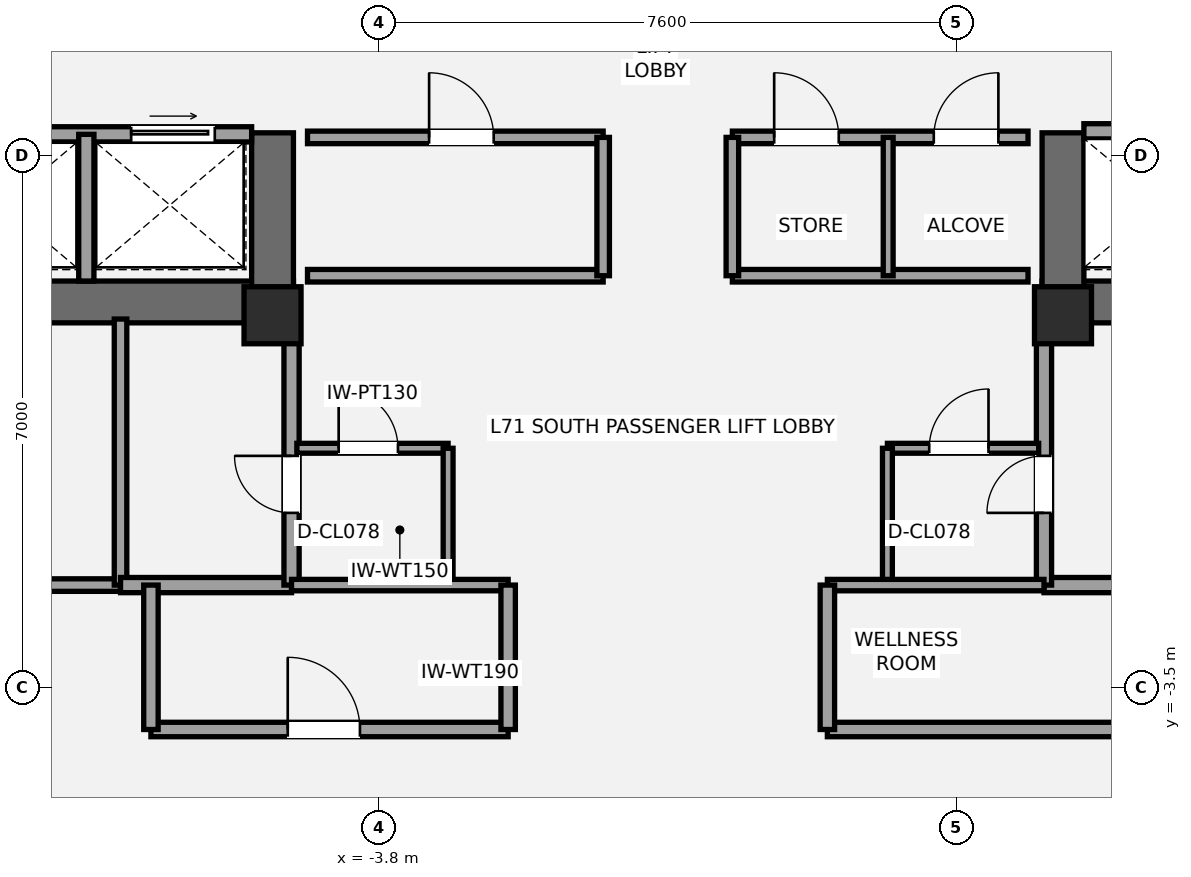
"""IFC4 building model, lengths in metres.
Left out: names, types, materials, properties, quantities, classifications, styles, units other than length and angle.
Written with IfcOpenShell. Run it as: python <this file> out.ifc"""

import sys

from ifc_helpers import new_model, si_unit, direction, frame, frame_2d, origin, origin_2d, place, context, subcontext, project, spatial, rectangle, extrude, element, fill, save


model = new_model("IFC4")
c1 = context("Model", 3, precision=1e-05, world=origin(), true_north=direction((0.0, 1.0)))
c2 = subcontext(c1, "Body", "Model", "MODEL_VIEW")
j1 = project(units=[si_unit("LENGTHUNIT", "METRE"), si_unit("PLANEANGLEUNIT", "RADIAN")], contexts=[c1])
p1 = place(None, origin())
s1 = spatial("IfcSite", under=j1, at=p1, CompositionType="ELEMENT")
p2 = place(p1, origin())
s2 = spatial("IfcBuilding", under=s1, at=p2, CompositionType="ELEMENT")
p3 = place(p2, frame((0.0, 0.0, 250.95)))
s3 = spatial("IfcBuildingStorey", under=s2, at=p3, CompositionType="ELEMENT", Elevation=250.95)
p4 = place(p3, frame((-4.925, 1.575, 0.0), z_axis=(0.0, 0.0, 1.0), x_axis=(-1.0, 0.0, 0.0)))
e1 = element("IfcWall", 1, at=p4, inside=s3, PredefinedType="SHEAR", context=c2, shape_type="SweptSolid", body=[
    extrude(rectangle(XDim=8.775, YDim=0.55, at=frame_2d((4.387, 0.0))), origin(), (0.0, 0.0, 1.0), 3.15),
])
p5 = place(p4, frame((5.375, 0.0, 0.0)))
e2 = element("IfcOpeningElement", 2, at=p5, cuts=e1, PredefinedType="OPENING", context=c2, shape_type="SweptSolid", body=[
    extrude(rectangle(XDim=1.05, YDim=2.15, at=frame_2d((0.525, 1.075))), frame((0.0, 0.285, 0.0), z_axis=(0.0, -1.0, 0.0), x_axis=(1.0, 0.0, 0.0)), (0.0, 0.0, 1.0), 0.57),
])
p6 = place(p4, frame((3.705, 0.0, 0.0)))
e3 = element("IfcOpeningElement", 3, at=p6, cuts=e1, PredefinedType="OPENING", context=c2, shape_type="SweptSolid", body=[
    extrude(rectangle(XDim=1.1, YDim=2.2, at=frame_2d((0.55, 1.1))), frame((0.0, 0.285, 0.0), z_axis=(0.0, -1.0, 0.0), x_axis=(1.0, 0.0, 0.0)), (0.0, 0.0, 1.0), 0.57),
])
p7 = place(p3, frame((-5.2, 1.3, 0.0), z_axis=(0.0, 0.0, 1.0), x_axis=(0.0, 1.0, 0.0)))
e4 = element("IfcWall", 4, at=p7, inside=s3, PredefinedType="SHEAR", context=c2, shape_type="SweptSolid", body=[
    extrude(rectangle(XDim=2.5, YDim=0.55, at=frame_2d((1.25, 0.0))), origin(), (0.0, 0.0, 1.0), 3.15),
])
p8 = place(p3, frame((13.7, 1.575, 0.0), z_axis=(0.0, 0.0, 1.0), x_axis=(-1.0, 0.0, 0.0)))
e5 = element("IfcWall", 5, at=p8, inside=s3, PredefinedType="SHEAR", context=c2, shape_type="SweptSolid", body=[
    extrude(rectangle(XDim=8.775, YDim=0.55, at=frame_2d((4.387, 0.0))), origin(), (0.0, 0.0, 1.0), 3.15),
])
p9 = place(p8, frame((2.35, 0.0, 0.0)))
e6 = element("IfcOpeningElement", 6, at=p9, cuts=e5, PredefinedType="OPENING", context=c2, shape_type="SweptSolid", body=[
    extrude(rectangle(XDim=1.05, YDim=2.15, at=frame_2d((0.525, 1.075))), frame((0.0, 0.285, 0.0), z_axis=(0.0, -1.0, 0.0), x_axis=(1.0, 0.0, 0.0)), (0.0, 0.0, 1.0), 0.57),
])
p10 = place(p8, frame((4.35, 0.0, 0.0)))
e7 = element("IfcOpeningElement", 7, at=p10, cuts=e5, PredefinedType="OPENING", context=c2, shape_type="SweptSolid", body=[
    extrude(rectangle(XDim=1.1, YDim=2.2, at=frame_2d((0.55, 1.1))), frame((0.0, 0.285, 0.0), z_axis=(0.0, -1.0, 0.0), x_axis=(1.0, 0.0, 0.0)), (0.0, 0.0, 1.0), 0.57),
])
p11 = place(p3, frame((5.2, 1.3, 0.0), z_axis=(0.0, 0.0, 1.0), x_axis=(0.0, 1.0, 0.0)))
e8 = element("IfcWall", 8, at=p11, inside=s3, PredefinedType="SHEAR", context=c2, shape_type="SweptSolid", body=[
    extrude(rectangle(XDim=2.5, YDim=0.55, at=frame_2d((1.25, 0.0))), origin(), (0.0, 0.0, 1.0), 3.15),
])
for number, where, z_axis, x_axis in (
    (9, (-5.2, 1.4, 0.0), (0.0, 0.0, 1.0), (1.0, 0.0, 0.0)),
    (10, (5.2, 1.4, 0.0), (0.0, 0.0, 1.0), (1.0, 0.0, 0.0)),
):
    element("IfcColumn", number, at=place(p3, frame(where, z_axis=z_axis, x_axis=x_axis)), inside=s3, PredefinedType="PILASTER", context=c2, shape_type="SweptSolid", body=[
        extrude(rectangle(XDim=0.75, YDim=0.75, at=origin_2d()), origin(), (0.0, 0.0, 1.0), 3.15),
    ])
p12 = place(p3, frame((-13.45, -2.15, 0.0), z_axis=(0.0, 0.0, 1.0), x_axis=(1.0, 0.0, 0.0)))
e11 = element("IfcWall", 11, at=p12, inside=s3, PredefinedType="PARTITIONING", context=c2, shape_type="SweptSolid", body=[
    extrude(rectangle(XDim=6.25, YDim=0.165, at=frame_2d((3.125, 0.0))), origin(), (0.0, 0.0, 1.0), 2.423),
])
p13 = place(p3, frame((-7.2, -2.15, 0.0), z_axis=(0.0, 0.0, 1.0), x_axis=(0.0, 1.0, 0.0)))
e12 = element("IfcWall", 12, at=p13, inside=s3, PredefinedType="PARTITIONING", context=c2, shape_type="SweptSolid", body=[
    extrude(rectangle(XDim=3.5, YDim=0.165, at=frame_2d((1.75, 0.0))), origin(), (0.0, 0.0, 1.0), 2.423),
])
p14 = place(p3, frame((-7.2, -2.15, 0.0), z_axis=(0.0, 0.0, 1.0), x_axis=(1.0, 0.0, 0.0)))
e13 = element("IfcWall", 13, at=p14, inside=s3, PredefinedType="SOLIDWALL", context=c2, shape_type="SweptSolid", body=[
    extrude(rectangle(XDim=2.25, YDim=0.2, at=frame_2d((1.125, 0.0))), origin(), (0.0, 0.0, 1.0), 2.97),
])
p15 = place(p3, frame((-4.95, -2.15, 0.0), z_axis=(0.0, 0.0, 1.0), x_axis=(0.0, 1.0, 0.0)))
e14 = element("IfcWall", 14, at=p15, inside=s3, PredefinedType="SOLIDWALL", context=c2, shape_type="SweptSolid", body=[
    extrude(rectangle(XDim=3.5, YDim=0.2, at=frame_2d((1.75, 0.0))), origin(), (0.0, 0.0, 1.0), 2.423),
])
p16 = place(p15, frame((0.95, 0.0, 0.0)))
e15 = element("IfcOpeningElement", 15, at=p16, cuts=e14, PredefinedType="OPENING", context=c2, shape_type="SweptSolid", body=[
    extrude(rectangle(XDim=0.75, YDim=2.1, at=frame_2d((0.375, 1.05))), frame((0.0, 0.11, 0.0), z_axis=(0.0, -1.0, 0.0), x_axis=(1.0, 0.0, 0.0)), (0.0, 0.0, 1.0), 0.22),
])
p17 = place(p3, frame((4.95, -2.15, 0.0), z_axis=(0.0, 0.0, 1.0), x_axis=(1.0, 0.0, 0.0)))
e16 = element("IfcWall", 16, at=p17, inside=s3, PredefinedType="SOLIDWALL", context=c2, shape_type="SweptSolid", body=[
    extrude(rectangle(XDim=2.25, YDim=0.2, at=frame_2d((1.125, 0.0))), origin(), (0.0, 0.0, 1.0), 2.97),
])
p18 = place(p3, frame((4.95, -2.15, 0.0), z_axis=(0.0, 0.0, 1.0), x_axis=(0.0, 1.0, 0.0)))
e17 = element("IfcWall", 17, at=p18, inside=s3, PredefinedType="SOLIDWALL", context=c2, shape_type="SweptSolid", body=[
    extrude(rectangle(XDim=3.5, YDim=0.2, at=frame_2d((1.75, 0.0))), origin(), (0.0, 0.0, 1.0), 2.423),
])
p19 = place(p18, frame((0.95, 0.0, 0.0)))
e18 = element("IfcOpeningElement", 18, at=p19, cuts=e17, PredefinedType="OPENING", context=c2, shape_type="SweptSolid", body=[
    extrude(rectangle(XDim=0.75, YDim=2.1, at=frame_2d((0.375, 1.05))), frame((0.0, 0.11, 0.0), z_axis=(0.0, -1.0, 0.0), x_axis=(1.0, 0.0, 0.0)), (0.0, 0.0, 1.0), 0.22),
])
p20 = place(p3, frame((-4.88, -0.35, 0.0), z_axis=(0.0, 0.0, 1.0), x_axis=(1.0, 0.0, 0.0)))
e19 = element("IfcWall", 19, at=p20, inside=s3, PredefinedType="PARTITIONING", context=c2, shape_type="SweptSolid", body=[
    extrude(rectangle(XDim=1.99, YDim=0.13, at=frame_2d((0.995, 0.0))), origin(), (0.0, 0.0, 1.0), 2.97),
])
p21 = place(p20, frame((0.55, 0.0, 0.0)))
e20 = element("IfcOpeningElement", 20, at=p21, cuts=e19, PredefinedType="OPENING", context=c2, shape_type="SweptSolid", body=[
    extrude(rectangle(XDim=0.78, YDim=2.1, at=frame_2d((0.39, 1.05))), frame((0.0, 0.075, 0.0), z_axis=(0.0, -1.0, 0.0), x_axis=(1.0, 0.0, 0.0)), (0.0, 0.0, 1.0), 0.15),
])
p22 = place(p3, frame((-2.89, -2.15, 0.0), z_axis=(0.0, 0.0, 1.0), x_axis=(0.0, 1.0, 0.0)))
e21 = element("IfcWall", 21, at=p22, inside=s3, PredefinedType="PARTITIONING", context=c2, shape_type="SweptSolid", body=[
    extrude(rectangle(XDim=1.8, YDim=0.13, at=frame_2d((0.9, 0.0))), origin(), (0.0, 0.0, 1.0), 2.423),
])
p23 = place(p3, frame((2.89, -0.35, 0.0), z_axis=(0.0, 0.0, 1.0), x_axis=(1.0, 0.0, 0.0)))
e22 = element("IfcWall", 22, at=p23, inside=s3, PredefinedType="PARTITIONING", context=c2, shape_type="SweptSolid", body=[
    extrude(rectangle(XDim=1.99, YDim=0.13, at=frame_2d((0.995, 0.0))), origin(), (0.0, 0.0, 1.0), 2.97),
])
p24 = place(p23, frame((0.55, 0.0, 0.0)))
e23 = element("IfcOpeningElement", 23, at=p24, cuts=e22, PredefinedType="OPENING", context=c2, shape_type="SweptSolid", body=[
    extrude(rectangle(XDim=0.78, YDim=2.1, at=frame_2d((0.39, 1.05))), frame((0.0, 0.075, 0.0), z_axis=(0.0, -1.0, 0.0), x_axis=(1.0, 0.0, 0.0)), (0.0, 0.0, 1.0), 0.15),
])
p25 = place(p3, frame((2.89, -2.15, 0.0), z_axis=(0.0, 0.0, 1.0), x_axis=(0.0, 1.0, 0.0)))
e24 = element("IfcWall", 24, at=p25, inside=s3, PredefinedType="PARTITIONING", context=c2, shape_type="SweptSolid", body=[
    extrude(rectangle(XDim=1.8, YDim=0.13, at=frame_2d((0.9, 0.0))), origin(), (0.0, 0.0, 1.0), 2.97),
])
p26 = place(p3, frame((-9.78, 3.78, 0.0), z_axis=(0.0, 0.0, 1.0), x_axis=(1.0, 0.0, 0.0)))
e25 = element("IfcWall", 25, at=p26, inside=s3, PredefinedType="SOLIDWALL", context=c2, shape_type="SweptSolid", body=[
    extrude(rectangle(XDim=4.305, YDim=0.2, at=frame_2d((2.152, 0.0))), origin(), (0.0, 0.0, 1.0), 2.97),
])
p27 = place(p26, frame((2.72, 0.0, 0.0)))
e26 = element("IfcOpeningElement", 26, at=p27, cuts=e25, PredefinedType="OPENING", context=c2, shape_type="SweptSolid", body=[
    extrude(rectangle(XDim=1.1, YDim=2.2, at=frame_2d((0.55, 1.1))), frame((0.0, 0.11, 0.0), z_axis=(0.0, -1.0, 0.0), x_axis=(1.0, 0.0, 0.0)), (0.0, 0.0, 1.0), 0.22),
])
p28 = place(p3, frame((-7.65, 1.85, 0.0), z_axis=(0.0, 0.0, 1.0), x_axis=(0.0, 1.0, 0.0)))
e27 = element("IfcWall", 27, at=p28, inside=s3, PredefinedType="SOLIDWALL", context=c2, shape_type="SweptSolid", body=[
    extrude(rectangle(XDim=1.93, YDim=0.2, at=frame_2d((0.965, 0.0))), origin(), (0.0, 0.0, 1.0), 2.97),
])
p29 = place(p3, frame((5.475, 3.82, 0.0), z_axis=(0.0, 0.0, 1.0), x_axis=(1.0, 0.0, 0.0)))
e28 = element("IfcWall", 28, at=p29, inside=s3, PredefinedType="SOLIDWALL", context=c2, shape_type="SweptSolid", body=[
    extrude(rectangle(XDim=4.305, YDim=0.2, at=frame_2d((2.152, 0.0))), origin(), (0.0, 0.0, 1.0), 2.97),
])
p30 = place(p29, frame((0.65, 0.0, 0.0)))
e29 = element("IfcOpeningElement", 29, at=p30, cuts=e28, PredefinedType="OPENING", context=c2, shape_type="SweptSolid", body=[
    extrude(rectangle(XDim=1.2, YDim=2.2, at=frame_2d((0.6, 1.1))), frame((0.0, 0.11, 0.0), z_axis=(0.0, -1.0, 0.0), x_axis=(1.0, 0.0, 0.0)), (0.0, 0.0, 1.0), 0.22),
])
p31 = place(p3, frame((-4.74, 1.92, 0.0), z_axis=(0.0, 0.0, 1.0), x_axis=(1.0, 0.0, 0.0)))
e30 = element("IfcWall", 30, at=p31, inside=s3, PredefinedType="PARTITIONING", context=c2, shape_type="SweptSolid", body=[
    extrude(rectangle(XDim=3.89, YDim=0.165, at=frame_2d((1.945, 0.0))), origin(), (0.0, 0.0, 1.0), 2.11),
])
p32 = place(p3, frame((-4.74, 3.74, 0.0), z_axis=(0.0, 0.0, 1.0), x_axis=(1.0, 0.0, 0.0)))
e31 = element("IfcWall", 31, at=p32, inside=s3, PredefinedType="PARTITIONING", context=c2, shape_type="SweptSolid", body=[
    extrude(rectangle(XDim=3.89, YDim=0.165, at=frame_2d((1.945, 0.0))), origin(), (0.0, 0.0, 1.0), 2.97),
])
p33 = place(p32, frame((1.6, 0.0, 0.0)))
e32 = element("IfcOpeningElement", 32, at=p33, cuts=e31, PredefinedType="OPENING", context=c2, shape_type="SweptSolid", body=[
    extrude(rectangle(XDim=0.85, YDim=2.1, at=frame_2d((0.425, 1.05))), frame((0.0, 0.093, 0.0), z_axis=(0.0, -1.0, 0.0), x_axis=(1.0, 0.0, 0.0)), (0.0, 0.0, 1.0), 0.185),
])
p34 = place(p3, frame((-0.85, 1.92, 0.0), z_axis=(0.0, 0.0, 1.0), x_axis=(0.0, 1.0, 0.0)))
e33 = element("IfcWall", 33, at=p34, inside=s3, PredefinedType="PARTITIONING", context=c2, shape_type="SweptSolid", body=[
    extrude(rectangle(XDim=1.82, YDim=0.165, at=frame_2d((0.91, 0.0))), origin(), (0.0, 0.0, 1.0), 2.97),
])
p35 = place(p3, frame((0.85, 1.92, 0.0), z_axis=(0.0, 0.0, 1.0), x_axis=(1.0, 0.0, 0.0)))
e34 = element("IfcWall", 34, at=p35, inside=s3, PredefinedType="PARTITIONING", context=c2, shape_type="SweptSolid", body=[
    extrude(rectangle(XDim=3.89, YDim=0.165, at=frame_2d((1.945, 0.0))), origin(), (0.0, 0.0, 1.0), 2.11),
])
p36 = place(p3, frame((0.85, 3.74, 0.0), z_axis=(0.0, 0.0, 1.0), x_axis=(1.0, 0.0, 0.0)))
e35 = element("IfcWall", 35, at=p36, inside=s3, PredefinedType="PARTITIONING", context=c2, shape_type="SweptSolid", body=[
    extrude(rectangle(XDim=3.89, YDim=0.165, at=frame_2d((1.945, 0.0))), origin(), (0.0, 0.0, 1.0), 2.97),
])
p37 = place(p36, frame((0.55, 0.0, 0.0)))
e36 = element("IfcOpeningElement", 36, at=p37, cuts=e35, PredefinedType="OPENING", context=c2, shape_type="SweptSolid", body=[
    extrude(rectangle(XDim=0.85, YDim=2.1, at=frame_2d((0.425, 1.05))), frame((0.0, 0.093, 0.0), z_axis=(0.0, -1.0, 0.0), x_axis=(1.0, 0.0, 0.0)), (0.0, 0.0, 1.0), 0.185),
])
p38 = place(p36, frame((2.65, 0.0, 0.0)))
e37 = element("IfcOpeningElement", 37, at=p38, cuts=e35, PredefinedType="OPENING", context=c2, shape_type="SweptSolid", body=[
    extrude(rectangle(XDim=0.85, YDim=2.1, at=frame_2d((0.425, 1.05))), frame((0.0, 0.093, 0.0), z_axis=(0.0, -1.0, 0.0), x_axis=(1.0, 0.0, 0.0)), (0.0, 0.0, 1.0), 0.185),
])
p39 = place(p3, frame((0.85, 1.92, 0.0), z_axis=(0.0, 0.0, 1.0), x_axis=(0.0, 1.0, 0.0)))
e38 = element("IfcWall", 38, at=p39, inside=s3, PredefinedType="PARTITIONING", context=c2, shape_type="SweptSolid", body=[
    extrude(rectangle(XDim=1.82, YDim=0.165, at=frame_2d((0.91, 0.0))), origin(), (0.0, 0.0, 1.0), 2.97),
])
p40 = place(p3, frame((2.9, 1.92, 0.0), z_axis=(0.0, 0.0, 1.0), x_axis=(0.0, 1.0, 0.0)))
e39 = element("IfcWall", 39, at=p40, inside=s3, PredefinedType="PARTITIONING", context=c2, shape_type="SweptSolid", body=[
    extrude(rectangle(XDim=1.82, YDim=0.13, at=frame_2d((0.91, 0.0))), origin(), (0.0, 0.0, 1.0), 2.97),
])
p41 = place(p3, frame((-6.8, -4.05, 0.0), z_axis=(0.0, 0.0, 1.0), x_axis=(1.0, 0.0, 0.0)))
e40 = element("IfcWall", 40, at=p41, inside=s3, PredefinedType="PLUMBINGWALL", context=c2, shape_type="SweptSolid", body=[
    extrude(rectangle(XDim=4.7, YDim=0.19, at=frame_2d((2.35, 0.0))), origin(), (0.0, 0.0, 1.0), 2.423),
])
p42 = place(p41, frame((1.8, 0.0, 0.0)))
e41 = element("IfcOpeningElement", 41, at=p42, cuts=e40, PredefinedType="OPENING", context=c2, shape_type="SweptSolid", body=[
    extrude(rectangle(XDim=0.95, YDim=2.15, at=frame_2d((0.475, 1.075))), frame((0.0, 0.105, 0.0), z_axis=(0.0, -1.0, 0.0), x_axis=(1.0, 0.0, 0.0)), (0.0, 0.0, 1.0), 0.21),
])
p43 = place(p3, frame((-4.95, -2.15, 0.0), z_axis=(0.0, 0.0, 1.0), x_axis=(1.0, 0.0, 0.0)))
e42 = element("IfcWall", 42, at=p43, inside=s3, PredefinedType="PLUMBINGWALL", context=c2, shape_type="SweptSolid", body=[
    extrude(rectangle(XDim=2.85, YDim=0.15, at=frame_2d((1.425, 0.0))), origin(), (0.0, 0.0, 1.0), 2.97),
])
for number, where, z_axis, x_axis in (
    (43, (-6.8, -4.05, 0.0), (0.0, 0.0, 1.0), (0.0, 1.0, 0.0)),
    (44, (-2.1, -4.05, 0.0), (0.0, 0.0, 1.0), (0.0, 1.0, 0.0)),
):
    element("IfcWall", number, at=place(p3, frame(where, z_axis=z_axis, x_axis=x_axis)), inside=s3, PredefinedType="PLUMBINGWALL", context=c2, shape_type="SweptSolid", body=[
        extrude(rectangle(XDim=1.9, YDim=0.19, at=frame_2d((0.95, 0.0))), origin(), (0.0, 0.0, 1.0), 2.423),
    ])
p44 = place(p3, frame((2.1, -4.05, 0.0), z_axis=(0.0, 0.0, 1.0), x_axis=(1.0, 0.0, 0.0)))
e45 = element("IfcWall", 45, at=p44, inside=s3, PredefinedType="PLUMBINGWALL", context=c2, shape_type="SweptSolid", body=[
    extrude(rectangle(XDim=11.35, YDim=0.19, at=frame_2d((5.675, 0.0))), origin(), (0.0, 0.0, 1.0), 2.357),
])
p45 = place(p44, frame((5.2, 0.0, 0.0)))
e46 = element("IfcOpeningElement", 46, at=p45, cuts=e45, PredefinedType="OPENING", context=c2, shape_type="SweptSolid", body=[
    extrude(rectangle(XDim=0.9, YDim=2.1, at=frame_2d((0.45, 1.05))), frame((0.0, 0.105, 0.0), z_axis=(0.0, -1.0, 0.0), x_axis=(1.0, 0.0, 0.0)), (0.0, 0.0, 1.0), 0.21),
])
p46 = place(p3, frame((2.1, -2.15, 0.0), z_axis=(0.0, 0.0, 1.0), x_axis=(1.0, 0.0, 0.0)))
e47 = element("IfcWall", 47, at=p46, inside=s3, PredefinedType="PLUMBINGWALL", context=c2, shape_type="SweptSolid", body=[
    extrude(rectangle(XDim=2.85, YDim=0.15, at=frame_2d((1.425, 0.0))), origin(), (0.0, 0.0, 1.0), 2.423),
])
p47 = place(p3, frame((2.1, -4.05, 0.0), z_axis=(0.0, 0.0, 1.0), x_axis=(0.0, 1.0, 0.0)))
e48 = element("IfcWall", 48, at=p47, inside=s3, PredefinedType="PLUMBINGWALL", context=c2, shape_type="SweptSolid", body=[
    extrude(rectangle(XDim=1.9, YDim=0.19, at=frame_2d((0.95, 0.0))), origin(), (0.0, 0.0, 1.0), 2.97),
])
p48 = place(p16, origin())
e49 = element("IfcDoor", 49, at=p48, inside=s3, OperationType="SINGLE_SWING_RIGHT", PredefinedType="DOOR", context=c2, shape_type="SweptSolid", body=[
    extrude(rectangle(XDim=0.75, YDim=2.1, at=frame_2d((0.375, 1.05))), frame((0.0, 0.025, 0.0), z_axis=(0.0, -1.0, 0.0), x_axis=(1.0, 0.0, 0.0)), (0.0, 0.0, 1.0), 0.05),
])
fill(e15, e49)
p49 = place(p19, origin())
e50 = element("IfcDoor", 50, at=p49, inside=s3, OperationType="SINGLE_SWING_LEFT", PredefinedType="DOOR", context=c2, shape_type="SweptSolid", body=[
    extrude(rectangle(XDim=0.75, YDim=2.1, at=frame_2d((0.375, 1.05))), frame((0.0, 0.025, 0.0), z_axis=(0.0, -1.0, 0.0), x_axis=(1.0, 0.0, 0.0)), (0.0, 0.0, 1.0), 0.05),
])
fill(e18, e50)
p50 = place(p21, origin())
e51 = element("IfcDoor", 51, at=p50, inside=s3, OperationType="SINGLE_SWING_LEFT", PredefinedType="DOOR", context=c2, shape_type="SweptSolid", body=[
    extrude(rectangle(XDim=0.78, YDim=2.1, at=frame_2d((0.39, 1.05))), frame((0.0, 0.025, 0.0), z_axis=(0.0, -1.0, 0.0), x_axis=(1.0, 0.0, 0.0)), (0.0, 0.0, 1.0), 0.05),
])
fill(e20, e51)
p51 = place(p24, origin())
e52 = element("IfcDoor", 52, at=p51, inside=s3, OperationType="SINGLE_SWING_RIGHT", PredefinedType="DOOR", context=c2, shape_type="SweptSolid", body=[
    extrude(rectangle(XDim=0.78, YDim=2.1, at=frame_2d((0.39, 1.05))), frame((0.0, 0.025, 0.0), z_axis=(0.0, -1.0, 0.0), x_axis=(1.0, 0.0, 0.0)), (0.0, 0.0, 1.0), 0.05),
])
fill(e23, e52)
p52 = place(p27, origin())
e53 = element("IfcDoor", 53, at=p52, inside=s3, OperationType="SLIDING_TO_LEFT", PredefinedType="DOOR", context=c2, shape_type="SweptSolid", body=[
    extrude(rectangle(XDim=1.1, YDim=2.2, at=frame_2d((0.55, 1.1))), frame((0.0, 0.025, 0.0), z_axis=(0.0, -1.0, 0.0), x_axis=(1.0, 0.0, 0.0)), (0.0, 0.0, 1.0), 0.05),
])
fill(e26, e53)
p53 = place(p33, origin())
e54 = element("IfcDoor", 54, at=p53, inside=s3, OperationType="SINGLE_SWING_LEFT", PredefinedType="DOOR", context=c2, shape_type="SweptSolid", body=[
    extrude(rectangle(XDim=0.85, YDim=2.1, at=frame_2d((0.425, 1.05))), frame((0.0, 0.025, 0.0), z_axis=(0.0, -1.0, 0.0), x_axis=(1.0, 0.0, 0.0)), (0.0, 0.0, 1.0), 0.05),
])
fill(e32, e54)
p54 = place(p37, origin())
e55 = element("IfcDoor", 55, at=p54, inside=s3, OperationType="SINGLE_SWING_LEFT", PredefinedType="DOOR", context=c2, shape_type="SweptSolid", body=[
    extrude(rectangle(XDim=0.85, YDim=2.1, at=frame_2d((0.425, 1.05))), frame((0.0, 0.025, 0.0), z_axis=(0.0, -1.0, 0.0), x_axis=(1.0, 0.0, 0.0)), (0.0, 0.0, 1.0), 0.05),
])
fill(e36, e55)
p55 = place(p38, origin())
e56 = element("IfcDoor", 56, at=p55, inside=s3, OperationType="SINGLE_SWING_RIGHT", PredefinedType="DOOR", context=c2, shape_type="SweptSolid", body=[
    extrude(rectangle(XDim=0.85, YDim=2.1, at=frame_2d((0.425, 1.05))), frame((0.0, 0.025, 0.0), z_axis=(0.0, -1.0, 0.0), x_axis=(1.0, 0.0, 0.0)), (0.0, 0.0, 1.0), 0.05),
])
fill(e37, e56)
p56 = place(p42, origin())
e57 = element("IfcDoor", 57, at=p56, inside=s3, OperationType="SINGLE_SWING_LEFT", PredefinedType="DOOR", context=c2, shape_type="SweptSolid", body=[
    extrude(rectangle(XDim=0.95, YDim=2.15, at=frame_2d((0.475, 1.075))), frame((0.0, 0.025, 0.0), z_axis=(0.0, -1.0, 0.0), x_axis=(1.0, 0.0, 0.0)), (0.0, 0.0, 1.0), 0.05),
])
fill(e41, e57)
save(model, sys.argv[1])
